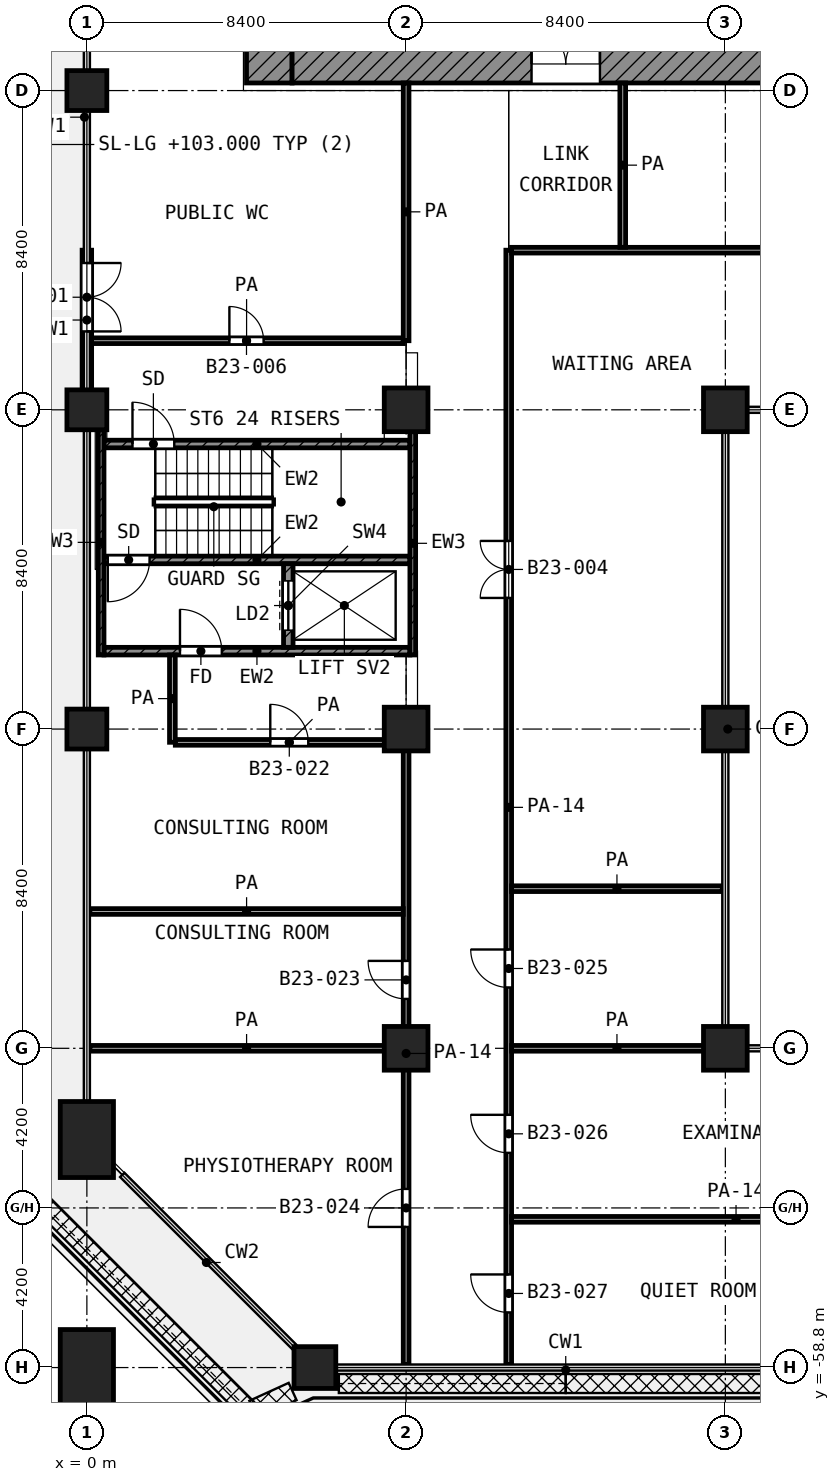
"""IFC4 building model, lengths in metres.
Left out: names, types, materials, properties, quantities, classifications, styles, units other than length and angle.
Written with IfcOpenShell. Run it as: python <this file> out.ifc"""

import sys

from ifc_helpers import new_model, si_unit, direction, frame, frame_2d, origin, origin_2d, place, context, subcontext, project, spatial, rectangle, extrude, element, fill, save


model = new_model("IFC4")
c1 = context("Model", 3, precision=1e-05, world=origin(), true_north=direction((0.0, 1.0)))
c2 = subcontext(c1, "Body", "Model", "MODEL_VIEW")
j1 = project(units=[si_unit("LENGTHUNIT", "METRE"), si_unit("PLANEANGLEUNIT", "RADIAN")], contexts=[c1])
p1 = place(None, origin())
s1 = spatial("IfcSite", under=j1, at=p1, CompositionType="ELEMENT")
p2 = place(p1, origin())
s2 = spatial("IfcBuilding", under=s1, at=p2, CompositionType="ELEMENT")
p3 = place(p2, frame((0.0, 0.0, 103.0)))
s3 = spatial("IfcBuildingStorey", under=s2, at=p3, CompositionType="ELEMENT", Elevation=103.0)
for number, where, z_axis, x_axis in (
    (1, (0.0, -25.2, 0.0), (0.0, 0.0, 1.0), (1.0, 0.0, 0.0)),
    (2, (0.0, -33.6, 0.0), (0.0, 0.0, 1.0), (1.0, 0.0, 0.0)),
):
    element("IfcColumn", number, at=place(p3, frame(where, z_axis=z_axis, x_axis=x_axis)), inside=s3, PredefinedType="COLUMN", context=c2, shape_type="SweptSolid", body=[
        extrude(rectangle(XDim=1.05, YDim=1.05, at=origin_2d()), origin(), (0.0, 0.0, 1.0), 4.2),
    ])
for number, where, z_axis, x_axis in (
    (3, (8.4, -33.6, 0.0), (0.0, 0.0, 1.0), (1.0, 0.0, 0.0)),
    (4, (16.8, -33.6, 0.0), (0.0, 0.0, 1.0), (1.0, 0.0, 0.0)),
):
    element("IfcColumn", number, at=place(p3, frame(where, z_axis=z_axis, x_axis=x_axis)), inside=s3, PredefinedType="COLUMN", context=c2, shape_type="SweptSolid", body=[
        extrude(rectangle(XDim=1.15, YDim=1.15, at=origin_2d()), origin(), (0.0, 0.0, 1.0), 4.2),
    ])
p4 = place(p3, frame((0.0, -42.0, 0.0), z_axis=(0.0, 0.0, 1.0), x_axis=(1.0, 0.0, 0.0)))
e5 = element("IfcColumn", 5, at=p4, inside=s3, PredefinedType="COLUMN", context=c2, shape_type="SweptSolid", body=[
    extrude(rectangle(XDim=1.05, YDim=1.05, at=origin_2d()), origin(), (0.0, 0.0, 1.0), 4.2),
])
for number, where, z_axis, x_axis in (
    (6, (8.4, -42.0, 0.0), (0.0, 0.0, 1.0), (1.0, 0.0, 0.0)),
    (7, (16.8, -42.0, 0.0), (0.0, 0.0, 1.0), (1.0, 0.0, 0.0)),
    (8, (8.4, -50.4, 0.0), (0.0, 0.0, 1.0), (1.0, 0.0, 0.0)),
    (9, (16.8, -50.4, 0.0), (0.0, 0.0, 1.0), (1.0, 0.0, 0.0)),
):
    element("IfcColumn", number, at=place(p3, frame(where, z_axis=z_axis, x_axis=x_axis)), inside=s3, PredefinedType="COLUMN", context=c2, shape_type="SweptSolid", body=[
        extrude(rectangle(XDim=1.15, YDim=1.15, at=origin_2d()), origin(), (0.0, 0.0, 1.0), 4.2),
    ])
p5 = place(p3, frame((0.0, -52.8, 0.0), z_axis=(0.0, 0.0, 1.0), x_axis=(0.0, 1.0, 0.0)))
e10 = element("IfcColumn", 10, at=p5, inside=s3, PredefinedType="COLUMN", context=c2, shape_type="SweptSolid", body=[
    extrude(rectangle(XDim=2.0, YDim=1.4, at=origin_2d()), origin(), (0.0, 0.0, 1.0), 4.2),
])
p6 = place(p3, frame((6.0, -58.8, 0.0), z_axis=(0.0, 0.0, 1.0), x_axis=(1.0, 0.0, 0.0)))
e11 = element("IfcColumn", 11, at=p6, inside=s3, PredefinedType="COLUMN", context=c2, shape_type="SweptSolid", body=[
    extrude(rectangle(XDim=1.1, YDim=1.1, at=origin_2d()), origin(), (0.0, 0.0, 1.0), 4.2),
])
p7 = place(p3, frame((0.0, -58.8, 0.0), z_axis=(0.0, 0.0, 1.0), x_axis=(0.0, 1.0, 0.0)))
e12 = element("IfcColumn", 12, at=p7, inside=s3, PredefinedType="COLUMN", context=c2, shape_type="SweptSolid", body=[
    extrude(rectangle(XDim=2.0, YDim=1.4, at=origin_2d()), origin(), (0.0, 0.0, 1.0), 4.2),
])
p8 = place(p3, frame((0.0, -29.4, 0.0), z_axis=(0.0, 0.0, 1.0), x_axis=(0.0, -1.0, 0.0)))
e13 = element("IfcWall", 13, at=p8, inside=s3, PredefinedType="SOLIDWALL", context=c2, shape_type="SweptSolid", body=[
    extrude(rectangle(XDim=3.675, YDim=0.25, at=frame_2d((1.837, 0.0))), origin(), (0.0, 0.0, 1.0), 3.48),
])
p9 = place(p8, frame((0.337, 0.0, 0.0)))
e14 = element("IfcOpeningElement", 14, at=p9, cuts=e13, PredefinedType="OPENING", context=c2, shape_type="SweptSolid", body=[
    extrude(rectangle(XDim=1.8, YDim=2.1, at=frame_2d((0.9, 1.05))), frame((0.0, 0.135, 0.0), z_axis=(0.0, -1.0, 0.0), x_axis=(1.0, 0.0, 0.0)), (0.0, 0.0, 1.0), 0.27),
])
p10 = place(p3, frame((4.8, -25.0, 0.0), z_axis=(0.0, 0.0, 1.0), x_axis=(0.0, 1.0, 0.0)))
e15 = element("IfcWall", 15, at=p10, inside=s3, PredefinedType="SHEAR", context=c2, shape_type="SweptSolid", body=[
    extrude(rectangle(XDim=19.6, YDim=1.2, at=frame_2d((9.8, 0.0))), origin(), (0.0, 0.0, 1.0), 3.6),
])
p11 = place(p10, frame((11.45, 0.0, 0.0)))
e16 = element("IfcOpeningElement", 16, at=p11, cuts=e15, PredefinedType="OPENING", context=c2, shape_type="SweptSolid", body=[
    extrude(rectangle(XDim=1.1, YDim=2.1, at=frame_2d((0.55, 1.05))), frame((0.0, 0.61, 0.0), z_axis=(0.0, -1.0, 0.0), x_axis=(1.0, 0.0, 0.0)), (0.0, 0.0, 1.0), 1.22),
])
p12 = place(p10, frame((2.15, 0.0, 0.0)))
e17 = element("IfcOpeningElement", 17, at=p12, cuts=e15, PredefinedType="OPENING", context=c2, shape_type="SweptSolid", body=[
    extrude(rectangle(XDim=1.1, YDim=2.1, at=frame_2d((0.55, 1.05))), frame((0.0, 0.61, 0.0), z_axis=(0.0, -1.0, 0.0), x_axis=(1.0, 0.0, 0.0)), (0.0, 0.0, 1.0), 1.22),
])
p13 = place(p3, frame((5.4, -24.5, 0.0), z_axis=(0.0, 0.0, 1.0), x_axis=(1.0, 0.0, 0.0)))
e18 = element("IfcWall", 18, at=p13, inside=s3, PredefinedType="SHEAR", context=c2, shape_type="SweptSolid", body=[
    extrude(rectangle(XDim=18.6, YDim=1.0, at=frame_2d((9.3, 0.0))), origin(), (0.0, 0.0, 1.0), 3.6),
])
p14 = place(p13, frame((6.3, 0.0, 0.0)))
e19 = element("IfcOpeningElement", 19, at=p14, cuts=e18, PredefinedType="OPENING", context=c2, shape_type="SweptSolid", body=[
    extrude(rectangle(XDim=1.8, YDim=2.1, at=frame_2d((0.9, 1.05))), frame((0.0, 0.51, 0.0), z_axis=(0.0, -1.0, 0.0), x_axis=(1.0, 0.0, 0.0)), (0.0, 0.0, 1.0), 1.02),
])
p15 = place(p3, frame((0.375, -40.05, 0.0), z_axis=(0.0, 0.0, 1.0), x_axis=(0.0, 1.0, 0.0)))
e20 = element("IfcWall", 20, at=p15, inside=s3, PredefinedType="SHEAR", context=c2, shape_type="SweptSolid", body=[
    extrude(rectangle(XDim=5.925, YDim=0.15, at=frame_2d((2.962, 0.0))), origin(), (0.0, 0.0, 1.0), 3.6),
])
p16 = place(p3, frame((8.575, -40.05, 0.0), z_axis=(0.0, 0.0, 1.0), x_axis=(0.0, 1.0, 0.0)))
e21 = element("IfcWall", 21, at=p16, inside=s3, PredefinedType="SHEAR", context=c2, shape_type="SweptSolid", body=[
    extrude(rectangle(XDim=5.875, YDim=0.15, at=frame_2d((2.938, 0.0))), origin(), (0.0, 0.0, 1.0), 3.6),
])
p17 = place(p3, frame((0.45, -34.5, 0.0), z_axis=(0.0, 0.0, 1.0), x_axis=(1.0, 0.0, 0.0)))
e22 = element("IfcWall", 22, at=p17, inside=s3, PredefinedType="SHEAR", context=c2, shape_type="SweptSolid", body=[
    extrude(rectangle(XDim=8.05, YDim=0.2, at=frame_2d((4.025, 0.0))), origin(), (0.0, 0.0, 1.0), 3.6),
])
p18 = place(p17, frame((0.75, 0.0, 0.0)))
e23 = element("IfcOpeningElement", 23, at=p18, cuts=e22, PredefinedType="OPENING", context=c2, shape_type="SweptSolid", body=[
    extrude(rectangle(XDim=1.1, YDim=2.1, at=frame_2d((0.55, 1.05))), frame((0.0, 0.11, 0.0), z_axis=(0.0, -1.0, 0.0), x_axis=(1.0, 0.0, 0.0)), (0.0, 0.0, 1.0), 0.22),
])
p19 = place(p3, frame((0.45, -37.55, 0.0), z_axis=(0.0, 0.0, 1.0), x_axis=(1.0, 0.0, 0.0)))
e24 = element("IfcWall", 24, at=p19, inside=s3, PredefinedType="SHEAR", context=c2, shape_type="SweptSolid", body=[
    extrude(rectangle(XDim=8.05, YDim=0.2, at=frame_2d((4.025, 0.0))), origin(), (0.0, 0.0, 1.0), 3.6),
])
p20 = place(p19, frame((0.1, 0.0, 0.0)))
e25 = element("IfcOpeningElement", 25, at=p20, cuts=e24, PredefinedType="OPENING", context=c2, shape_type="SweptSolid", body=[
    extrude(rectangle(XDim=1.1, YDim=2.1, at=frame_2d((0.55, 1.05))), frame((0.0, 0.11, 0.0), z_axis=(0.0, -1.0, 0.0), x_axis=(1.0, 0.0, 0.0)), (0.0, 0.0, 1.0), 0.22),
])
p21 = place(p3, frame((0.45, -39.95, 0.0), z_axis=(0.0, 0.0, 1.0), x_axis=(1.0, 0.0, 0.0)))
e26 = element("IfcWall", 26, at=p21, inside=s3, PredefinedType="SHEAR", context=c2, shape_type="SweptSolid", body=[
    extrude(rectangle(XDim=8.05, YDim=0.2, at=frame_2d((4.025, 0.0))), origin(), (0.0, 0.0, 1.0), 3.6),
])
p22 = place(p21, frame((2.0, 0.0, 0.0)))
e27 = element("IfcOpeningElement", 27, at=p22, cuts=e26, PredefinedType="OPENING", context=c2, shape_type="SweptSolid", body=[
    extrude(rectangle(XDim=1.1, YDim=2.1, at=frame_2d((0.55, 1.05))), frame((0.0, 0.11, 0.0), z_axis=(0.0, -1.0, 0.0), x_axis=(1.0, 0.0, 0.0)), (0.0, 0.0, 1.0), 0.22),
])
p23 = place(p3, frame((5.3, -39.85, 0.0), z_axis=(0.0, 0.0, 1.0), x_axis=(0.0, 1.0, 0.0)))
e28 = element("IfcWall", 28, at=p23, inside=s3, PredefinedType="SHEAR", context=c2, shape_type="SweptSolid", body=[
    extrude(rectangle(XDim=2.2, YDim=0.25, at=frame_2d((1.1, 0.0))), origin(), (0.0, 0.0, 1.0), 3.6),
])
p24 = place(p23, frame((0.45, 0.0, 0.0)))
e29 = element("IfcOpeningElement", 29, at=p24, cuts=e28, PredefinedType="OPENING", context=c2, shape_type="SweptSolid", body=[
    extrude(rectangle(XDim=1.3, YDim=2.1, at=frame_2d((0.65, 1.05))), frame((0.0, 0.135, 0.0), z_axis=(0.0, -1.0, 0.0), x_axis=(1.0, 0.0, 0.0)), (0.0, 0.0, 1.0), 0.27),
])
p25 = place(p3, frame((11.175, -54.9, 0.0), z_axis=(0.0, 0.0, 1.0), x_axis=(1.0, 0.0, 0.0)))
e30 = element("IfcWall", 30, at=p25, inside=s3, PredefinedType="PARTITIONING", context=c2, shape_type="SweptSolid", body=[
    extrude(rectangle(XDim=11.812, YDim=0.15, at=frame_2d((5.906, 0.0))), origin(), (0.0, 0.0, 1.0), 2.7),
])
p26 = place(p3, frame((0.08, -50.4, 0.0), z_axis=(0.0, 0.0, 1.0), x_axis=(1.0, 0.0, 0.0)))
e31 = element("IfcWall", 31, at=p26, inside=s3, PredefinedType="PARTITIONING", context=c2, shape_type="SweptSolid", body=[
    extrude(rectangle(XDim=8.245, YDim=0.15, at=frame_2d((4.123, 0.0))), origin(), (0.0, 0.0, 1.0), 3.6),
])
p27 = place(p3, frame((11.175, -50.4, 0.0), z_axis=(0.0, 0.0, 1.0), x_axis=(1.0, 0.0, 0.0)))
e32 = element("IfcWall", 32, at=p27, inside=s3, PredefinedType="PARTITIONING", context=c2, shape_type="SweptSolid", body=[
    extrude(rectangle(XDim=5.545, YDim=0.15, at=frame_2d((2.772, 0.0))), origin(), (0.0, 0.0, 1.0), 3.6),
])
p28 = place(p3, frame((0.08, -46.8, 0.0), z_axis=(0.0, 0.0, 1.0), x_axis=(1.0, 0.0, 0.0)))
e33 = element("IfcWall", 33, at=p28, inside=s3, PredefinedType="PARTITIONING", context=c2, shape_type="SweptSolid", body=[
    extrude(rectangle(XDim=8.245, YDim=0.15, at=frame_2d((4.123, 0.0))), origin(), (0.0, 0.0, 1.0), 3.6),
])
p29 = place(p3, frame((11.175, -46.2, 0.0), z_axis=(0.0, 0.0, 1.0), x_axis=(1.0, 0.0, 0.0)))
e34 = element("IfcWall", 34, at=p29, inside=s3, PredefinedType="PARTITIONING", context=c2, shape_type="SweptSolid", body=[
    extrude(rectangle(XDim=5.545, YDim=0.15, at=frame_2d((2.772, 0.0))), origin(), (0.0, 0.0, 1.0), 3.6),
])
p30 = place(p3, frame((2.327, -42.35, 0.0), z_axis=(0.0, 0.0, 1.0), x_axis=(1.0, 0.0, 0.0)))
e35 = element("IfcWall", 35, at=p30, inside=s3, PredefinedType="PARTITIONING", context=c2, shape_type="SweptSolid", body=[
    extrude(rectangle(XDim=5.998, YDim=0.15, at=frame_2d((2.999, 0.0))), origin(), (0.0, 0.0, 1.0), 3.6),
])
p31 = place(p30, frame((2.499, 0.0, 0.0)))
e36 = element("IfcOpeningElement", 36, at=p31, cuts=e35, PredefinedType="OPENING", context=c2, shape_type="SweptSolid", body=[
    extrude(rectangle(XDim=1.0, YDim=2.1, at=frame_2d((0.5, 1.05))), frame((0.0, 0.085, 0.0), z_axis=(0.0, -1.0, 0.0), x_axis=(1.0, 0.0, 0.0)), (0.0, 0.0, 1.0), 0.17),
])
p32 = place(p3, frame((0.08, -31.782, 0.0), z_axis=(0.0, 0.0, 1.0), x_axis=(1.0, 0.0, 0.0)))
e37 = element("IfcWall", 37, at=p32, inside=s3, PredefinedType="PARTITIONING", context=c2, shape_type="SweptSolid", body=[
    extrude(rectangle(XDim=8.245, YDim=0.15, at=frame_2d((4.123, 0.0))), origin(), (0.0, 0.0, 1.0), 3.6),
])
p33 = place(p32, frame((3.67, 0.0, 0.0)))
e38 = element("IfcOpeningElement", 38, at=p33, cuts=e37, PredefinedType="OPENING", context=c2, shape_type="SweptSolid", body=[
    extrude(rectangle(XDim=0.9, YDim=2.1, at=frame_2d((0.45, 1.05))), frame((0.0, 0.085, 0.0), z_axis=(0.0, -1.0, 0.0), x_axis=(1.0, 0.0, 0.0)), (0.0, 0.0, 1.0), 0.17),
])
p34 = place(p3, frame((11.175, -29.4, 0.0), z_axis=(0.0, 0.0, 1.0), x_axis=(1.0, 0.0, 0.0)))
e39 = element("IfcWall", 39, at=p34, inside=s3, PredefinedType="PARTITIONING", context=c2, shape_type="SweptSolid", body=[
    extrude(rectangle(XDim=13.95, YDim=0.15, at=frame_2d((6.975, 0.0))), origin(), (0.0, 0.0, 1.0), 3.6),
])
p35 = place(p3, frame((2.25, -42.348, 0.0), z_axis=(0.0, 0.0, 1.0), x_axis=(0.0, 1.0, 0.0)))
e40 = element("IfcWall", 40, at=p35, inside=s3, PredefinedType="PARTITIONING", context=c2, shape_type="SweptSolid", body=[
    extrude(rectangle(XDim=2.298, YDim=0.15, at=frame_2d((1.149, 0.0))), origin(), (0.0, 0.0, 1.0), 3.6),
])
p36 = place(p3, frame((8.4, -58.72, 0.0), z_axis=(0.0, 0.0, 1.0), x_axis=(0.0, 1.0, 0.0)))
e41 = element("IfcWall", 41, at=p36, inside=s3, PredefinedType="PARTITIONING", context=c2, shape_type="SweptSolid", body=[
    extrude(rectangle(XDim=16.37, YDim=0.15, at=frame_2d((8.185, 0.0))), origin(), (0.0, 0.0, 1.0), 2.7),
])
p37 = place(p36, frame((9.62, 0.0, 0.0)))
e42 = element("IfcOpeningElement", 42, at=p37, cuts=e41, PredefinedType="OPENING", context=c2, shape_type="SweptSolid", body=[
    extrude(rectangle(XDim=1.0, YDim=2.1, at=frame_2d((0.5, 1.05))), frame((0.0, 0.085, 0.0), z_axis=(0.0, -1.0, 0.0), x_axis=(1.0, 0.0, 0.0)), (0.0, 0.0, 1.0), 0.17),
])
p38 = place(p36, frame((3.62, 0.0, 0.0)))
e43 = element("IfcOpeningElement", 43, at=p38, cuts=e41, PredefinedType="OPENING", context=c2, shape_type="SweptSolid", body=[
    extrude(rectangle(XDim=1.0, YDim=2.1, at=frame_2d((0.5, 1.05))), frame((0.0, 0.085, 0.0), z_axis=(0.0, -1.0, 0.0), x_axis=(1.0, 0.0, 0.0)), (0.0, 0.0, 1.0), 0.17),
])
p39 = place(p3, frame((8.4, -31.782, 0.0), z_axis=(0.0, 0.0, 1.0), x_axis=(0.0, 1.0, 0.0)))
e44 = element("IfcWall", 44, at=p39, inside=s3, PredefinedType="PARTITIONING", context=c2, shape_type="SweptSolid", body=[
    extrude(rectangle(XDim=6.782, YDim=0.15, at=frame_2d((3.391, 0.0))), origin(), (0.0, 0.0, 1.0), 3.6),
])
p40 = place(p3, frame((11.1, -58.72, 0.0), z_axis=(0.0, 0.0, 1.0), x_axis=(0.0, 1.0, 0.0)))
e45 = element("IfcWall", 45, at=p40, inside=s3, PredefinedType="PARTITIONING", context=c2, shape_type="SweptSolid", body=[
    extrude(rectangle(XDim=29.32, YDim=0.15, at=frame_2d((14.66, 0.0))), origin(), (0.0, 0.0, 1.0), 2.7),
])
p41 = place(p40, frame((20.17, 0.0, 0.0)))
e46 = element("IfcOpeningElement", 46, at=p41, cuts=e45, PredefinedType="OPENING", context=c2, shape_type="SweptSolid", body=[
    extrude(rectangle(XDim=1.5, YDim=2.1, at=frame_2d((0.75, 1.05))), frame((0.0, 0.085, 0.0), z_axis=(0.0, -1.0, 0.0), x_axis=(1.0, 0.0, 0.0)), (0.0, 0.0, 1.0), 0.17),
])
p42 = place(p40, frame((9.92, 0.0, 0.0)))
e47 = element("IfcOpeningElement", 47, at=p42, cuts=e45, PredefinedType="OPENING", context=c2, shape_type="SweptSolid", body=[
    extrude(rectangle(XDim=1.0, YDim=2.1, at=frame_2d((0.5, 1.05))), frame((0.0, 0.085, 0.0), z_axis=(0.0, -1.0, 0.0), x_axis=(1.0, 0.0, 0.0)), (0.0, 0.0, 1.0), 0.17),
])
p43 = place(p40, frame((5.57, 0.0, 0.0)))
e48 = element("IfcOpeningElement", 48, at=p43, cuts=e45, PredefinedType="OPENING", context=c2, shape_type="SweptSolid", body=[
    extrude(rectangle(XDim=1.0, YDim=2.1, at=frame_2d((0.5, 1.05))), frame((0.0, 0.085, 0.0), z_axis=(0.0, -1.0, 0.0), x_axis=(1.0, 0.0, 0.0)), (0.0, 0.0, 1.0), 0.17),
])
p44 = place(p40, frame((1.37, 0.0, 0.0)))
e49 = element("IfcOpeningElement", 49, at=p44, cuts=e45, PredefinedType="OPENING", context=c2, shape_type="SweptSolid", body=[
    extrude(rectangle(XDim=1.0, YDim=2.1, at=frame_2d((0.5, 1.05))), frame((0.0, 0.085, 0.0), z_axis=(0.0, -1.0, 0.0), x_axis=(1.0, 0.0, 0.0)), (0.0, 0.0, 1.0), 0.17),
])
p45 = place(p3, frame((14.1, -29.325, 0.0), z_axis=(0.0, 0.0, 1.0), x_axis=(0.0, 1.0, 0.0)))
e50 = element("IfcWall", 50, at=p45, inside=s3, PredefinedType="PARTITIONING", context=c2, shape_type="SweptSolid", body=[
    extrude(rectangle(XDim=4.325, YDim=0.15, at=frame_2d((2.163, 0.0))), origin(), (0.0, 0.0, 1.0), 3.6),
])
p46 = place(p9, origin())
e51 = element("IfcDoor", 51, at=p46, inside=s3, OperationType="DOUBLE_DOOR_SINGLE_SWING", PredefinedType="DOOR", context=c2, shape_type="SweptSolid", body=[
    extrude(rectangle(XDim=1.8, YDim=2.1, at=frame_2d((0.9, 1.05))), frame((0.0, 0.025, 0.0), z_axis=(0.0, -1.0, 0.0), x_axis=(1.0, 0.0, 0.0)), (0.0, 0.0, 1.0), 0.05),
])
fill(e14, e51)
p47 = place(p14, origin())
e52 = element("IfcDoor", 52, at=p47, inside=s3, OperationType="DOUBLE_DOOR_SINGLE_SWING", PredefinedType="DOOR", context=c2, shape_type="SweptSolid", body=[
    extrude(rectangle(XDim=1.8, YDim=2.1, at=frame_2d((0.9, 1.05))), frame((0.0, 0.025, 0.0), z_axis=(0.0, -1.0, 0.0), x_axis=(1.0, 0.0, 0.0)), (0.0, 0.0, 1.0), 0.05),
])
fill(e19, e52)
p48 = place(p18, origin())
e53 = element("IfcDoor", 53, at=p48, inside=s3, OperationType="SINGLE_SWING_LEFT", PredefinedType="DOOR", context=c2, shape_type="SweptSolid", body=[
    extrude(rectangle(XDim=1.1, YDim=2.1, at=frame_2d((0.55, 1.05))), frame((0.0, 0.025, 0.0), z_axis=(0.0, -1.0, 0.0), x_axis=(1.0, 0.0, 0.0)), (0.0, 0.0, 1.0), 0.05),
])
fill(e23, e53)
p49 = place(p20, frame((1.1, 0.0, 0.0), z_axis=(0.0, 0.0, 1.0), x_axis=(-1.0, 0.0, 0.0)))
e54 = element("IfcDoor", 54, at=p49, inside=s3, OperationType="SINGLE_SWING_LEFT", PredefinedType="DOOR", context=c2, shape_type="SweptSolid", body=[
    extrude(rectangle(XDim=1.1, YDim=2.1, at=frame_2d((0.55, 1.05))), frame((0.0, 0.025, 0.0), z_axis=(0.0, -1.0, 0.0), x_axis=(1.0, 0.0, 0.0)), (0.0, 0.0, 1.0), 0.05),
])
fill(e25, e54)
p50 = place(p24, origin())
e55 = element("IfcDoor", 55, at=p50, inside=s3, OperationType="DOUBLE_DOOR_SLIDING", PredefinedType="DOOR", context=c2, shape_type="SweptSolid", body=[
    extrude(rectangle(XDim=1.3, YDim=2.1, at=frame_2d((0.65, 1.05))), frame((0.0, 0.025, 0.0), z_axis=(0.0, -1.0, 0.0), x_axis=(1.0, 0.0, 0.0)), (0.0, 0.0, 1.0), 0.05),
])
fill(e29, e55)
p51 = place(p22, origin())
e56 = element("IfcDoor", 56, at=p51, inside=s3, OperationType="SINGLE_SWING_LEFT", PredefinedType="DOOR", context=c2, shape_type="SweptSolid", body=[
    extrude(rectangle(XDim=1.1, YDim=2.1, at=frame_2d((0.55, 1.05))), frame((0.0, 0.025, 0.0), z_axis=(0.0, -1.0, 0.0), x_axis=(1.0, 0.0, 0.0)), (0.0, 0.0, 1.0), 0.05),
])
fill(e27, e56)
p52 = place(p33, origin())
e57 = element("IfcDoor", 57, at=p52, inside=s3, OperationType="SINGLE_SWING_LEFT", PredefinedType="DOOR", context=c2, shape_type="SweptSolid", body=[
    extrude(rectangle(XDim=0.9, YDim=2.1, at=frame_2d((0.45, 1.05))), frame((0.0, 0.025, 0.0), z_axis=(0.0, -1.0, 0.0), x_axis=(1.0, 0.0, 0.0)), (0.0, 0.0, 1.0), 0.05),
])
fill(e38, e57)
p53 = place(p31, origin())
e58 = element("IfcDoor", 58, at=p53, inside=s3, OperationType="SINGLE_SWING_LEFT", PredefinedType="DOOR", context=c2, shape_type="SweptSolid", body=[
    extrude(rectangle(XDim=1.0, YDim=2.1, at=frame_2d((0.5, 1.05))), frame((0.0, 0.025, 0.0), z_axis=(0.0, -1.0, 0.0), x_axis=(1.0, 0.0, 0.0)), (0.0, 0.0, 1.0), 0.05),
])
fill(e36, e58)
p54 = place(p37, origin())
e59 = element("IfcDoor", 59, at=p54, inside=s3, OperationType="SINGLE_SWING_RIGHT", PredefinedType="DOOR", context=c2, shape_type="SweptSolid", body=[
    extrude(rectangle(XDim=1.0, YDim=2.1, at=frame_2d((0.5, 1.05))), frame((0.0, 0.025, 0.0), z_axis=(0.0, -1.0, 0.0), x_axis=(1.0, 0.0, 0.0)), (0.0, 0.0, 1.0), 0.05),
])
fill(e42, e59)
p55 = place(p38, origin())
e60 = element("IfcDoor", 60, at=p55, inside=s3, OperationType="SINGLE_SWING_LEFT", PredefinedType="DOOR", context=c2, shape_type="SweptSolid", body=[
    extrude(rectangle(XDim=1.0, YDim=2.1, at=frame_2d((0.5, 1.05))), frame((0.0, 0.025, 0.0), z_axis=(0.0, -1.0, 0.0), x_axis=(1.0, 0.0, 0.0)), (0.0, 0.0, 1.0), 0.05),
])
fill(e43, e60)
p56 = place(p41, origin())
e61 = element("IfcDoor", 61, at=p56, inside=s3, OperationType="DOUBLE_DOOR_SINGLE_SWING", PredefinedType="DOOR", context=c2, shape_type="SweptSolid", body=[
    extrude(rectangle(XDim=1.5, YDim=2.1, at=frame_2d((0.75, 1.05))), frame((0.0, 0.025, 0.0), z_axis=(0.0, -1.0, 0.0), x_axis=(1.0, 0.0, 0.0)), (0.0, 0.0, 1.0), 0.05),
])
fill(e46, e61)
p57 = place(p42, origin())
e62 = element("IfcDoor", 62, at=p57, inside=s3, OperationType="SINGLE_SWING_RIGHT", PredefinedType="DOOR", context=c2, shape_type="SweptSolid", body=[
    extrude(rectangle(XDim=1.0, YDim=2.1, at=frame_2d((0.5, 1.05))), frame((0.0, 0.025, 0.0), z_axis=(0.0, -1.0, 0.0), x_axis=(1.0, 0.0, 0.0)), (0.0, 0.0, 1.0), 0.05),
])
fill(e47, e62)
p58 = place(p43, origin())
e63 = element("IfcDoor", 63, at=p58, inside=s3, OperationType="SINGLE_SWING_RIGHT", PredefinedType="DOOR", context=c2, shape_type="SweptSolid", body=[
    extrude(rectangle(XDim=1.0, YDim=2.1, at=frame_2d((0.5, 1.05))), frame((0.0, 0.025, 0.0), z_axis=(0.0, -1.0, 0.0), x_axis=(1.0, 0.0, 0.0)), (0.0, 0.0, 1.0), 0.05),
])
fill(e48, e63)
p59 = place(p44, origin())
e64 = element("IfcDoor", 64, at=p59, inside=s3, OperationType="SINGLE_SWING_RIGHT", PredefinedType="DOOR", context=c2, shape_type="SweptSolid", body=[
    extrude(rectangle(XDim=1.0, YDim=2.1, at=frame_2d((0.5, 1.05))), frame((0.0, 0.025, 0.0), z_axis=(0.0, -1.0, 0.0), x_axis=(1.0, 0.0, 0.0)), (0.0, 0.0, 1.0), 0.05),
])
fill(e49, e64)
save(model, sys.argv[1])
